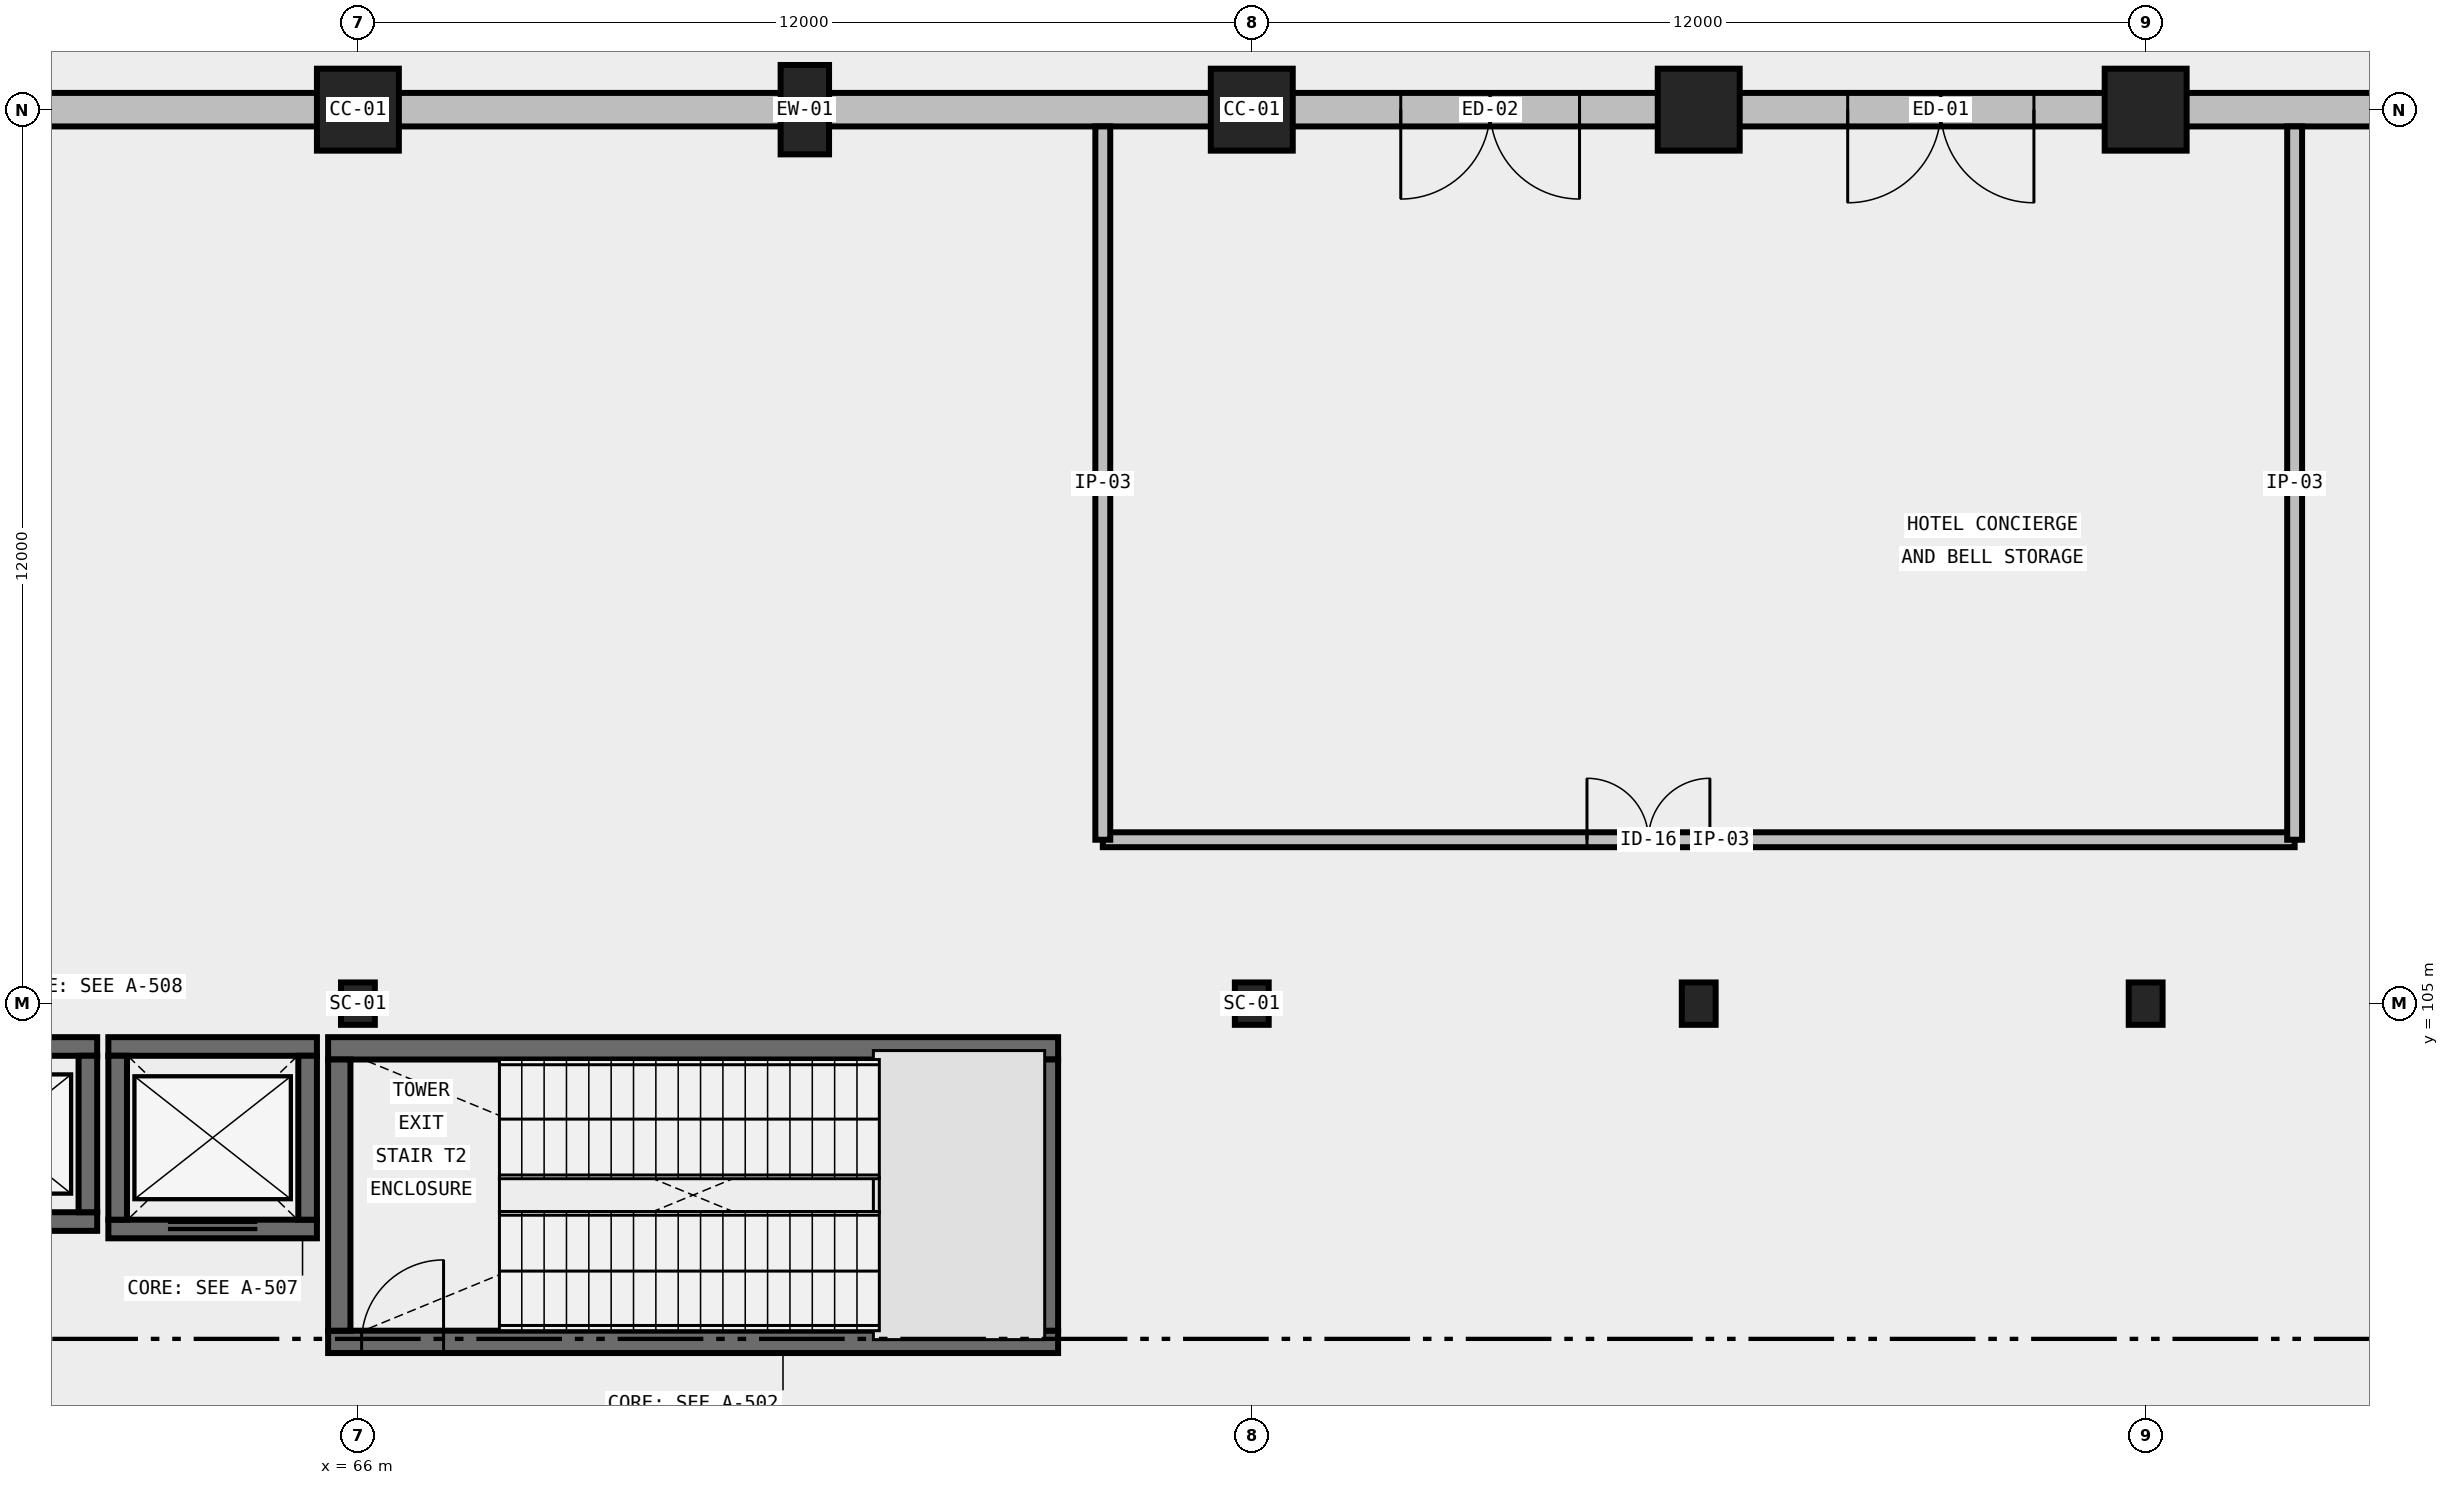
"""IFC4 building model, lengths in metres.
Left out: names, types, materials, properties, quantities, classifications, styles, units other than length and angle.
Written with IfcOpenShell. Run it as: python <this file> out.ifc"""

import sys

from ifc_helpers import new_model, si_unit, direction, frame, frame_2d, origin, origin_2d, place, context, subcontext, project, spatial, rectangle, i_section, extrude, element, fill, save


model = new_model("IFC4")
c1 = context("Model", 3, precision=1e-05, world=origin(), true_north=direction((0.0, 1.0)))
c2 = subcontext(c1, "Body", "Model", "MODEL_VIEW")
j1 = project(units=[si_unit("LENGTHUNIT", "METRE"), si_unit("PLANEANGLEUNIT", "RADIAN")], contexts=[c1])
p1 = place(None, origin())
s1 = spatial("IfcSite", under=j1, at=p1, CompositionType="ELEMENT")
p2 = place(p1, origin())
s2 = spatial("IfcBuilding", under=s1, at=p2, CompositionType="ELEMENT")
p3 = place(p2, origin())
s3 = spatial("IfcBuildingStorey", under=s2, at=p3, CompositionType="ELEMENT", Elevation=0.0)
p4 = place(p3, frame((66.0, 105.0, 0.0), z_axis=(0.0, 0.0, 1.0), x_axis=(1.0, 0.0, 0.0)))
e1 = element("IfcColumn", 1, at=p4, inside=s3, PredefinedType="COLUMN", context=c2, shape_type="SweptSolid", body=[
    extrude(i_section(OverallWidth=0.454, OverallDepth=0.569, WebThickness=0.078, FlangeThickness=0.125, FilletRadius=0.031, at=origin_2d()), origin(), (0.0, 0.0, 1.0), 6.0),
])
p5 = place(p3, frame((66.0, 117.0, 0.0), z_axis=(0.0, 0.0, 1.0), x_axis=(1.0, 0.0, 0.0)))
e2 = element("IfcColumn", 2, at=p5, inside=s3, PredefinedType="COLUMN", context=c2, shape_type="SweptSolid", body=[
    extrude(rectangle(XDim=1.1, YDim=1.1, at=origin_2d()), origin(), (0.0, 0.0, 1.0), 6.0),
])
p6 = place(p3, frame((78.0, 105.0, 0.0), z_axis=(0.0, 0.0, 1.0), x_axis=(1.0, 0.0, 0.0)))
e3 = element("IfcColumn", 3, at=p6, inside=s3, PredefinedType="COLUMN", context=c2, shape_type="SweptSolid", body=[
    extrude(i_section(OverallWidth=0.454, OverallDepth=0.569, WebThickness=0.078, FlangeThickness=0.125, FilletRadius=0.031, at=origin_2d()), origin(), (0.0, 0.0, 1.0), 6.0),
])
p7 = place(p3, frame((78.0, 117.0, 0.0), z_axis=(0.0, 0.0, 1.0), x_axis=(1.0, 0.0, 0.0)))
e4 = element("IfcColumn", 4, at=p7, inside=s3, PredefinedType="COLUMN", context=c2, shape_type="SweptSolid", body=[
    extrude(rectangle(XDim=1.1, YDim=1.1, at=origin_2d()), origin(), (0.0, 0.0, 1.0), 6.0),
])
p8 = place(p3, frame((84.0, 105.0, 0.0), z_axis=(0.0, 0.0, 1.0), x_axis=(1.0, 0.0, 0.0)))
e5 = element("IfcColumn", 5, at=p8, inside=s3, PredefinedType="COLUMN", context=c2, shape_type="SweptSolid", body=[
    extrude(i_section(OverallWidth=0.454, OverallDepth=0.569, WebThickness=0.078, FlangeThickness=0.125, FilletRadius=0.031, at=origin_2d()), origin(), (0.0, 0.0, 1.0), 6.0),
])
p9 = place(p3, frame((84.0, 117.0, 0.0), z_axis=(0.0, 0.0, 1.0), x_axis=(1.0, 0.0, 0.0)))
e6 = element("IfcColumn", 6, at=p9, inside=s3, PredefinedType="COLUMN", context=c2, shape_type="SweptSolid", body=[
    extrude(rectangle(XDim=1.1, YDim=1.1, at=origin_2d()), origin(), (0.0, 0.0, 1.0), 6.0),
])
p10 = place(p3, frame((90.0, 105.0, 0.0), z_axis=(0.0, 0.0, 1.0), x_axis=(1.0, 0.0, 0.0)))
e7 = element("IfcColumn", 7, at=p10, inside=s3, PredefinedType="COLUMN", context=c2, shape_type="SweptSolid", body=[
    extrude(i_section(OverallWidth=0.454, OverallDepth=0.569, WebThickness=0.078, FlangeThickness=0.125, FilletRadius=0.031, at=origin_2d()), origin(), (0.0, 0.0, 1.0), 6.0),
])
p11 = place(p3, frame((90.0, 117.0, 0.0), z_axis=(0.0, 0.0, 1.0), x_axis=(1.0, 0.0, 0.0)))
e8 = element("IfcColumn", 8, at=p11, inside=s3, PredefinedType="COLUMN", context=c2, shape_type="SweptSolid", body=[
    extrude(rectangle(XDim=1.1, YDim=1.1, at=origin_2d()), origin(), (0.0, 0.0, 1.0), 6.0),
])
p12 = place(p3, frame((72.0, 117.0, 0.0), z_axis=(0.0, 0.0, 1.0), x_axis=(1.0, 0.0, 0.0)))
e9 = element("IfcColumn", 9, at=p12, inside=s3, PredefinedType="PILASTER", context=c2, shape_type="SweptSolid", body=[
    extrude(rectangle(XDim=0.65, YDim=1.2, at=origin_2d()), origin(), (0.0, 0.0, 1.0), 6.0),
])
p13 = place(p3, frame((65.6, 100.46, 0.0), z_axis=(0.0, 0.0, 1.0), x_axis=(1.0, 0.0, 0.0)))
e10 = element("IfcWall", 10, at=p13, inside=s3, PredefinedType="SHEAR", context=c2, shape_type="SweptSolid", body=[
    extrude(rectangle(XDim=9.8, YDim=0.3, at=frame_2d((4.9, 0.0))), origin(), (0.0, 0.0, 1.0), 6.0),
])
p14 = place(p13, frame((0.45, 0.0, 0.0)))
e11 = element("IfcOpeningElement", 11, at=p14, cuts=e10, PredefinedType="OPENING", context=c2, shape_type="SweptSolid", body=[
    extrude(rectangle(XDim=1.1, YDim=2.2, at=frame_2d((0.55, 1.1))), frame((0.0, 0.165, 0.0), z_axis=(0.0, -1.0, 0.0), x_axis=(1.0, 0.0, 0.0)), (0.0, 0.0, 1.0), 0.33),
])
p15 = place(p3, frame((75.4, 104.4, 0.0), z_axis=(0.0, 0.0, 1.0), x_axis=(-1.0, 0.0, 0.0)))
e12 = element("IfcWall", 12, at=p15, inside=s3, PredefinedType="SHEAR", context=c2, shape_type="SweptSolid", body=[
    extrude(rectangle(XDim=9.8, YDim=0.3, at=frame_2d((4.9, 0.0))), origin(), (0.0, 0.0, 1.0), 6.0),
])
for number, where, z_axis, x_axis in (
    (13, (65.75, 104.25, 0.0), (0.0, 0.0, 1.0), (0.0, -1.0, 0.0)),
    (14, (75.25, 100.61, 0.0), (0.0, 0.0, 1.0), (0.0, 1.0, 0.0)),
):
    element("IfcWall", number, at=place(p3, frame(where, z_axis=z_axis, x_axis=x_axis)), inside=s3, PredefinedType="SHEAR", context=c2, shape_type="SweptSolid", body=[
        extrude(rectangle(XDim=3.64, YDim=0.3, at=frame_2d((1.82, 0.0))), origin(), (0.0, 0.0, 1.0), 6.0),
    ])
p16 = place(p3, frame((62.65, 101.975, 0.0), z_axis=(0.0, 0.0, 1.0), x_axis=(1.0, 0.0, 0.0)))
e15 = element("IfcWall", 15, at=p16, inside=s3, PredefinedType="SHEAR", context=c2, shape_type="SweptSolid", body=[
    extrude(rectangle(XDim=2.8, YDim=0.25, at=frame_2d((1.4, 0.0))), origin(), (0.0, 0.0, 1.0), 6.0),
])
p17 = place(p16, frame((0.8, 0.0, 0.0)))
e16 = element("IfcOpeningElement", 16, at=p17, cuts=e15, PredefinedType="OPENING", context=c2, shape_type="SweptSolid", body=[
    extrude(rectangle(XDim=1.2, YDim=2.2, at=frame_2d((0.6, 1.1))), frame((0.0, 0.14, 0.0), z_axis=(0.0, -1.0, 0.0), x_axis=(1.0, 0.0, 0.0)), (0.0, 0.0, 1.0), 0.28),
])
p18 = place(p3, frame((65.45, 104.425, 0.0), z_axis=(0.0, 0.0, 1.0), x_axis=(-1.0, 0.0, 0.0)))
e17 = element("IfcWall", 17, at=p18, inside=s3, PredefinedType="SHEAR", context=c2, shape_type="SweptSolid", body=[
    extrude(rectangle(XDim=2.8, YDim=0.25, at=frame_2d((1.4, 0.0))), origin(), (0.0, 0.0, 1.0), 6.0),
])
for number, where, z_axis, x_axis in (
    (18, (62.775, 104.3, 0.0), (0.0, 0.0, 1.0), (0.0, -1.0, 0.0)),
    (19, (65.325, 102.1, 0.0), (0.0, 0.0, 1.0), (0.0, 1.0, 0.0)),
):
    element("IfcWall", number, at=place(p3, frame(where, z_axis=z_axis, x_axis=x_axis)), inside=s3, PredefinedType="SHEAR", context=c2, shape_type="SweptSolid", body=[
        extrude(rectangle(XDim=2.2, YDim=0.25, at=frame_2d((1.1, 0.0))), origin(), (0.0, 0.0, 1.0), 6.0),
    ])
p19 = place(p3, frame((59.8, 102.075, 0.0), z_axis=(0.0, 0.0, 1.0), x_axis=(1.0, 0.0, 0.0)))
e20 = element("IfcWall", 20, at=p19, inside=s3, PredefinedType="SHEAR", context=c2, shape_type="SweptSolid", body=[
    extrude(rectangle(XDim=2.7, YDim=0.25, at=frame_2d((1.35, 0.0))), origin(), (0.0, 0.0, 1.0), 6.0),
])
p20 = place(p19, frame((0.8, 0.0, 0.0)))
e21 = element("IfcOpeningElement", 21, at=p20, cuts=e20, PredefinedType="OPENING", context=c2, shape_type="SweptSolid", body=[
    extrude(rectangle(XDim=1.1, YDim=2.2, at=frame_2d((0.55, 1.1))), frame((0.0, 0.14, 0.0), z_axis=(0.0, -1.0, 0.0), x_axis=(1.0, 0.0, 0.0)), (0.0, 0.0, 1.0), 0.28),
])
p21 = place(p3, frame((62.5, 104.425, 0.0), z_axis=(0.0, 0.0, 1.0), x_axis=(-1.0, 0.0, 0.0)))
e22 = element("IfcWall", 22, at=p21, inside=s3, PredefinedType="SHEAR", context=c2, shape_type="SweptSolid", body=[
    extrude(rectangle(XDim=2.7, YDim=0.25, at=frame_2d((1.35, 0.0))), origin(), (0.0, 0.0, 1.0), 6.0),
])
p22 = place(p3, frame((62.375, 102.2, 0.0), z_axis=(0.0, 0.0, 1.0), x_axis=(0.0, 1.0, 0.0)))
e23 = element("IfcWall", 23, at=p22, inside=s3, PredefinedType="SHEAR", context=c2, shape_type="SweptSolid", body=[
    extrude(rectangle(XDim=2.1, YDim=0.25, at=frame_2d((1.05, 0.0))), origin(), (0.0, 0.0, 1.0), 6.0),
])
for number, where, z_axis, x_axis in (
    (24, (66.0, 117.0, 0.0), (0.0, 0.0, 1.0), (-1.0, 0.0, 0.0)),
    (25, (78.0, 117.0, 0.0), (0.0, 0.0, 1.0), (-1.0, 0.0, 0.0)),
):
    element("IfcWall", number, at=place(p3, frame(where, z_axis=z_axis, x_axis=x_axis)), inside=s3, PredefinedType="STANDARD", context=c2, shape_type="SweptSolid", body=[
        extrude(rectangle(XDim=12.0, YDim=0.45, at=frame_2d((6.0, 0.0))), origin(), (0.0, 0.0, 1.0), 4.676),
    ])
p23 = place(p3, frame((90.0, 117.0, 0.0), z_axis=(0.0, 0.0, 1.0), x_axis=(-1.0, 0.0, 0.0)))
e26 = element("IfcWall", 26, at=p23, inside=s3, PredefinedType="STANDARD", context=c2, shape_type="SweptSolid", body=[
    extrude(rectangle(XDim=12.0, YDim=0.45, at=frame_2d((6.0, 0.0))), origin(), (0.0, 0.0, 1.0), 4.676),
])
p24 = place(p23, frame((1.5, 0.0, 0.0)))
e27 = element("IfcOpeningElement", 27, at=p24, cuts=e26, PredefinedType="OPENING", context=c2, shape_type="SweptSolid", body=[
    extrude(rectangle(XDim=2.5, YDim=2.55, at=frame_2d((1.25, 1.275))), frame((0.0, 0.24, 0.0), z_axis=(0.0, -1.0, 0.0), x_axis=(1.0, 0.0, 0.0)), (0.0, 0.0, 1.0), 0.48),
])
p25 = place(p23, frame((7.6, 0.0, 0.0)))
e28 = element("IfcOpeningElement", 28, at=p25, cuts=e26, PredefinedType="OPENING", context=c2, shape_type="SweptSolid", body=[
    extrude(rectangle(XDim=2.4, YDim=2.5, at=frame_2d((1.2, 1.25))), frame((0.0, 0.24, 0.0), z_axis=(0.0, -1.0, 0.0), x_axis=(1.0, 0.0, 0.0)), (0.0, 0.0, 1.0), 0.48),
])
p26 = place(p3, frame((96.0, 117.0, 0.0), z_axis=(0.0, 0.0, 1.0), x_axis=(-1.0, 0.0, 0.0)))
e29 = element("IfcWall", 29, at=p26, inside=s3, PredefinedType="STANDARD", context=c2, shape_type="SweptSolid", body=[
    extrude(rectangle(XDim=6.0, YDim=0.45, at=frame_2d((3.0, 0.0))), origin(), (0.0, 0.0, 1.0), 4.676),
])
p27 = place(p3, frame((76.0, 107.2, 0.0), z_axis=(0.0, 0.0, 1.0), x_axis=(1.0, 0.0, 0.0)))
e30 = element("IfcWall", 30, at=p27, inside=s3, PredefinedType="PARTITIONING", context=c2, shape_type="SweptSolid", body=[
    extrude(rectangle(XDim=16.0, YDim=0.2, at=frame_2d((8.0, 0.0))), origin(), (0.0, 0.0, 1.0), 5.68),
])
p28 = place(p27, frame((6.5, 0.0, 0.0)))
e31 = element("IfcOpeningElement", 31, at=p28, cuts=e30, PredefinedType="OPENING", context=c2, shape_type="SweptSolid", body=[
    extrude(rectangle(XDim=1.65, YDim=2.25, at=frame_2d((0.825, 1.125))), frame((0.0, 0.115, 0.0), z_axis=(0.0, -1.0, 0.0), x_axis=(1.0, 0.0, 0.0)), (0.0, 0.0, 1.0), 0.23),
])
for number, where, z_axis, x_axis in (
    (32, (92.0, 107.2, 0.0), (0.0, 0.0, 1.0), (0.0, 1.0, 0.0)),
    (33, (76.0, 116.775, 0.0), (0.0, 0.0, 1.0), (0.0, -1.0, 0.0)),
):
    element("IfcWall", number, at=place(p3, frame(where, z_axis=z_axis, x_axis=x_axis)), inside=s3, PredefinedType="PARTITIONING", context=c2, shape_type="SweptSolid", body=[
        extrude(rectangle(XDim=9.575, YDim=0.2, at=frame_2d((4.788, 0.0))), origin(), (0.0, 0.0, 1.0), 5.68),
    ])
p29 = place(p14, origin())
e34 = element("IfcDoor", 34, at=p29, inside=s3, OperationType="SINGLE_SWING_RIGHT", PredefinedType="DOOR", context=c2, shape_type="SweptSolid", body=[
    extrude(rectangle(XDim=1.1, YDim=2.2, at=frame_2d((0.55, 1.1))), frame((0.0, 0.025, 0.0), z_axis=(0.0, -1.0, 0.0), x_axis=(1.0, 0.0, 0.0)), (0.0, 0.0, 1.0), 0.05),
])
fill(e11, e34)
p30 = place(p17, origin())
e35 = element("IfcDoor", 35, at=p30, inside=s3, OperationType="DOUBLE_DOOR_SLIDING", PredefinedType="DOOR", context=c2, shape_type="SweptSolid", body=[
    extrude(rectangle(XDim=1.2, YDim=2.2, at=frame_2d((0.6, 1.1))), frame((0.0, 0.025, 0.0), z_axis=(0.0, -1.0, 0.0), x_axis=(1.0, 0.0, 0.0)), (0.0, 0.0, 1.0), 0.05),
])
fill(e16, e35)
p31 = place(p24, origin())
e36 = element("IfcDoor", 36, at=p31, inside=s3, OperationType="DOUBLE_DOOR_SINGLE_SWING", PredefinedType="DOOR", context=c2, shape_type="SweptSolid", body=[
    extrude(rectangle(XDim=2.5, YDim=2.55, at=frame_2d((1.25, 1.275))), frame((0.0, 0.025, 0.0), z_axis=(0.0, -1.0, 0.0), x_axis=(1.0, 0.0, 0.0)), (0.0, 0.0, 1.0), 0.05),
])
fill(e27, e36)
p32 = place(p25, origin())
e37 = element("IfcDoor", 37, at=p32, inside=s3, OperationType="DOUBLE_DOOR_SINGLE_SWING", PredefinedType="DOOR", context=c2, shape_type="SweptSolid", body=[
    extrude(rectangle(XDim=2.4, YDim=2.5, at=frame_2d((1.2, 1.25))), frame((0.0, 0.025, 0.0), z_axis=(0.0, -1.0, 0.0), x_axis=(1.0, 0.0, 0.0)), (0.0, 0.0, 1.0), 0.05),
])
fill(e28, e37)
p33 = place(p28, origin())
e38 = element("IfcDoor", 38, at=p33, inside=s3, OperationType="DOUBLE_DOOR_SINGLE_SWING", PredefinedType="DOOR", context=c2, shape_type="SweptSolid", body=[
    extrude(rectangle(XDim=1.65, YDim=2.25, at=frame_2d((0.825, 1.125))), frame((0.0, 0.025, 0.0), z_axis=(0.0, -1.0, 0.0), x_axis=(1.0, 0.0, 0.0)), (0.0, 0.0, 1.0), 0.05),
])
fill(e31, e38)
save(model, sys.argv[1])
